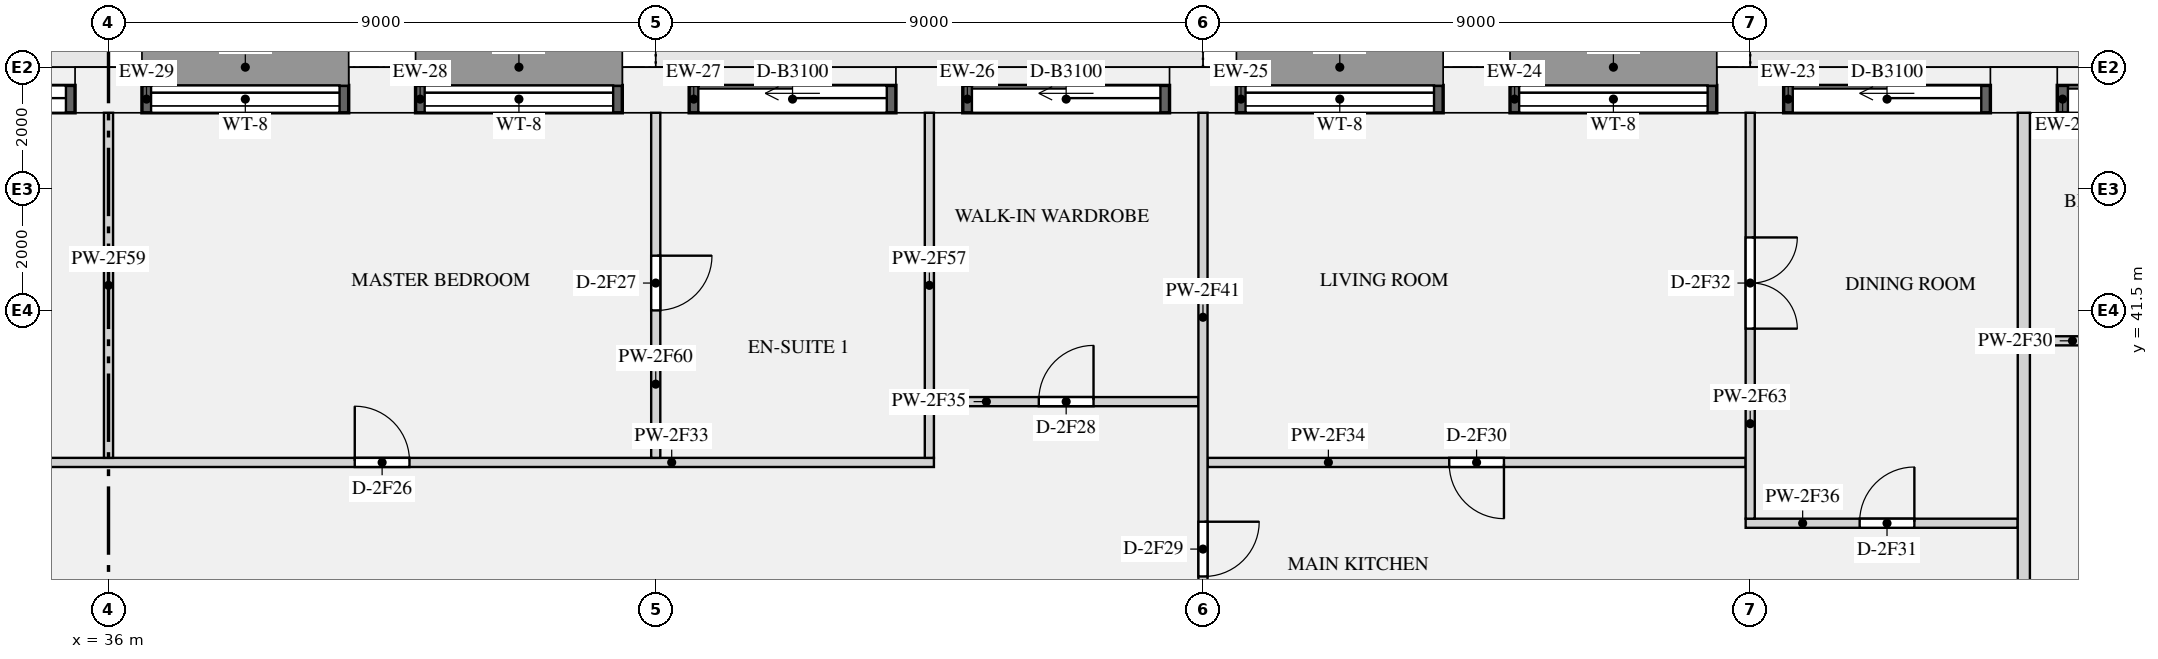
"""IFC4 building model, lengths in metres.
Left out: names, types, materials, properties, quantities, classifications, styles, units other than length and angle.
Written with IfcOpenShell. Run it as: python <this file> out.ifc"""

import sys

from ifc_helpers import new_model, si_unit, direction, frame, frame_2d, origin, origin_2d, place, context, subcontext, project, spatial, rectangle, extrude, element, fill, save


model = new_model("IFC4")
c1 = context("Model", 3, precision=1e-05, world=origin(), true_north=direction((0.0, 1.0)))
c2 = subcontext(c1, "Body", "Model", "MODEL_VIEW")
j1 = project(units=[si_unit("LENGTHUNIT", "METRE"), si_unit("PLANEANGLEUNIT", "RADIAN")], contexts=[c1])
p1 = place(None, origin())
s1 = spatial("IfcSite", under=j1, at=p1, CompositionType="ELEMENT")
p2 = place(p1, origin())
s2 = spatial("IfcBuilding", under=s1, at=p2, CompositionType="ELEMENT")
p3 = place(p2, frame((0.0, 0.0, 127.65)))
s3 = spatial("IfcBuildingStorey", under=s2, at=p3, CompositionType="ELEMENT", Elevation=127.65)
for number, where, z_axis, x_axis in (
    (1, (67.5, 45.125, 0.0), (0.0, 0.0, 1.0), (-1.0, 0.0, 0.0)),
    (2, (63.0, 45.125, 0.0), (0.0, 0.0, 1.0), (-1.0, 0.0, 0.0)),
    (3, (58.5, 45.125, 0.0), (0.0, 0.0, 1.0), (-1.0, 0.0, 0.0)),
    (4, (54.0, 45.125, 0.0), (0.0, 0.0, 1.0), (-1.0, 0.0, 0.0)),
    (5, (49.5, 45.125, 0.0), (0.0, 0.0, 1.0), (-1.0, 0.0, 0.0)),
    (6, (45.0, 45.125, 0.0), (0.0, 0.0, 1.0), (-1.0, 0.0, 0.0)),
    (7, (40.5, 45.125, 0.0), (0.0, 0.0, 1.0), (-1.0, 0.0, 0.0)),
    (8, (36.0, 45.125, 0.0), (0.0, 0.0, 1.0), (-1.0, 0.0, 0.0)),
):
    element("IfcColumn", number, at=place(p3, frame(where, z_axis=z_axis, x_axis=x_axis)), inside=s3, PredefinedType="USERDEFINED", context=c2, shape_type="SweptSolid", body=[
        extrude(rectangle(XDim=1.1, YDim=0.75, at=origin_2d()), origin(), (0.0, 0.0, 1.0), 3.15),
    ])
p4 = place(p3, frame((70.9, 44.975, 0.0), z_axis=(0.0, 0.0, 1.0), x_axis=(-1.0, 0.0, 0.0)))
e9 = element("IfcWall", 9, at=p4, inside=s3, PredefinedType="SOLIDWALL", context=c2, shape_type="SweptSolid", body=[
    extrude(rectangle(XDim=2.85, YDim=0.45, at=frame_2d((1.425, 0.0))), origin(), (0.0, 0.0, 1.0), 2.65),
])
p5 = place(p4, frame((0.175, 0.0, 0.0)))
e10 = element("IfcOpeningElement", 10, at=p5, cuts=e9, PredefinedType="OPENING", context=c2, shape_type="SweptSolid", body=[
    extrude(rectangle(XDim=2.5, YDim=2.3, at=frame_2d((1.25, 1.15))), frame((0.0, 0.235, 0.0), z_axis=(0.0, -1.0, 0.0), x_axis=(1.0, 0.0, 0.0)), (0.0, 0.0, 1.0), 0.47),
])
p6 = place(p3, frame((66.95, 44.975, 0.0), z_axis=(0.0, 0.0, 1.0), x_axis=(-1.0, 0.0, 0.0)))
e11 = element("IfcWall", 11, at=p6, inside=s3, PredefinedType="SOLIDWALL", context=c2, shape_type="SweptSolid", body=[
    extrude(rectangle(XDim=3.4, YDim=0.45, at=frame_2d((1.7, 0.0))), origin(), (0.0, 0.0, 1.0), 2.65),
])
p7 = place(p6, frame((0.15, 0.0, 0.0)))
e12 = element("IfcOpeningElement", 12, at=p7, cuts=e11, PredefinedType="OPENING", context=c2, shape_type="SweptSolid", body=[
    extrude(rectangle(XDim=3.1, YDim=2.3, at=frame_2d((1.55, 1.15))), frame((0.0, 0.235, 0.0), z_axis=(0.0, -1.0, 0.0), x_axis=(1.0, 0.0, 0.0)), (0.0, 0.0, 1.0), 0.47),
])
p8 = place(p3, frame((62.45, 44.975, 0.9), z_axis=(0.0, 0.0, 1.0), x_axis=(-1.0, 0.0, 0.0)))
e13 = element("IfcWall", 13, at=p8, inside=s3, PredefinedType="SOLIDWALL", context=c2, shape_type="SweptSolid", body=[
    extrude(rectangle(XDim=3.4, YDim=0.45, at=frame_2d((1.7, 0.0))), origin(), (0.0, 0.0, 1.0), 1.75),
])
p9 = place(p8, frame((0.15, 0.0, 0.15)))
e14 = element("IfcOpeningElement", 14, at=p9, cuts=e13, PredefinedType="OPENING", context=c2, shape_type="SweptSolid", body=[
    extrude(rectangle(XDim=3.1, YDim=1.5, at=frame_2d((1.55, 0.75))), frame((0.0, 0.235, 0.0), z_axis=(0.0, -1.0, 0.0), x_axis=(1.0, 0.0, 0.0)), (0.0, 0.0, 1.0), 0.47),
])
p10 = place(p3, frame((57.95, 44.975, 0.9), z_axis=(0.0, 0.0, 1.0), x_axis=(-1.0, 0.0, 0.0)))
e15 = element("IfcWall", 15, at=p10, inside=s3, PredefinedType="SOLIDWALL", context=c2, shape_type="SweptSolid", body=[
    extrude(rectangle(XDim=3.4, YDim=0.45, at=frame_2d((1.7, 0.0))), origin(), (0.0, 0.0, 1.0), 1.75),
])
p11 = place(p10, frame((0.15, 0.0, 0.15)))
e16 = element("IfcOpeningElement", 16, at=p11, cuts=e15, PredefinedType="OPENING", context=c2, shape_type="SweptSolid", body=[
    extrude(rectangle(XDim=3.1, YDim=1.5, at=frame_2d((1.55, 0.75))), frame((0.0, 0.235, 0.0), z_axis=(0.0, -1.0, 0.0), x_axis=(1.0, 0.0, 0.0)), (0.0, 0.0, 1.0), 0.47),
])
p12 = place(p3, frame((53.45, 44.975, 0.0), z_axis=(0.0, 0.0, 1.0), x_axis=(-1.0, 0.0, 0.0)))
e17 = element("IfcWall", 17, at=p12, inside=s3, PredefinedType="SOLIDWALL", context=c2, shape_type="SweptSolid", body=[
    extrude(rectangle(XDim=3.4, YDim=0.45, at=frame_2d((1.7, 0.0))), origin(), (0.0, 0.0, 1.0), 2.65),
])
p13 = place(p12, frame((0.15, 0.0, 0.0)))
e18 = element("IfcOpeningElement", 18, at=p13, cuts=e17, PredefinedType="OPENING", context=c2, shape_type="SweptSolid", body=[
    extrude(rectangle(XDim=3.1, YDim=2.3, at=frame_2d((1.55, 1.15))), frame((0.0, 0.235, 0.0), z_axis=(0.0, -1.0, 0.0), x_axis=(1.0, 0.0, 0.0)), (0.0, 0.0, 1.0), 0.47),
])
p14 = place(p3, frame((48.95, 44.975, 0.0), z_axis=(0.0, 0.0, 1.0), x_axis=(-1.0, 0.0, 0.0)))
e19 = element("IfcWall", 19, at=p14, inside=s3, PredefinedType="SOLIDWALL", context=c2, shape_type="SweptSolid", body=[
    extrude(rectangle(XDim=3.4, YDim=0.45, at=frame_2d((1.7, 0.0))), origin(), (0.0, 0.0, 1.0), 2.65),
])
p15 = place(p14, frame((0.15, 0.0, 0.0)))
e20 = element("IfcOpeningElement", 20, at=p15, cuts=e19, PredefinedType="OPENING", context=c2, shape_type="SweptSolid", body=[
    extrude(rectangle(XDim=3.1, YDim=2.3, at=frame_2d((1.55, 1.15))), frame((0.0, 0.235, 0.0), z_axis=(0.0, -1.0, 0.0), x_axis=(1.0, 0.0, 0.0)), (0.0, 0.0, 1.0), 0.47),
])
p16 = place(p3, frame((44.45, 44.975, 0.9), z_axis=(0.0, 0.0, 1.0), x_axis=(-1.0, 0.0, 0.0)))
e21 = element("IfcWall", 21, at=p16, inside=s3, PredefinedType="SOLIDWALL", context=c2, shape_type="SweptSolid", body=[
    extrude(rectangle(XDim=3.4, YDim=0.45, at=frame_2d((1.7, 0.0))), origin(), (0.0, 0.0, 1.0), 1.75),
])
p17 = place(p16, frame((0.15, 0.0, 0.15)))
e22 = element("IfcOpeningElement", 22, at=p17, cuts=e21, PredefinedType="OPENING", context=c2, shape_type="SweptSolid", body=[
    extrude(rectangle(XDim=3.1, YDim=1.5, at=frame_2d((1.55, 0.75))), frame((0.0, 0.235, 0.0), z_axis=(0.0, -1.0, 0.0), x_axis=(1.0, 0.0, 0.0)), (0.0, 0.0, 1.0), 0.47),
])
p18 = place(p3, frame((39.95, 44.975, 0.9), z_axis=(0.0, 0.0, 1.0), x_axis=(-1.0, 0.0, 0.0)))
e23 = element("IfcWall", 23, at=p18, inside=s3, PredefinedType="SOLIDWALL", context=c2, shape_type="SweptSolid", body=[
    extrude(rectangle(XDim=3.4, YDim=0.45, at=frame_2d((1.7, 0.0))), origin(), (0.0, 0.0, 1.0), 1.75),
])
p19 = place(p18, frame((0.15, 0.0, 0.15)))
e24 = element("IfcOpeningElement", 24, at=p19, cuts=e23, PredefinedType="OPENING", context=c2, shape_type="SweptSolid", body=[
    extrude(rectangle(XDim=3.1, YDim=1.5, at=frame_2d((1.55, 0.75))), frame((0.0, 0.235, 0.0), z_axis=(0.0, -1.0, 0.0), x_axis=(1.0, 0.0, 0.0)), (0.0, 0.0, 1.0), 0.47),
])
p20 = place(p3, frame((35.45, 44.975, 0.0), z_axis=(0.0, 0.0, 1.0), x_axis=(-1.0, 0.0, 0.0)))
e25 = element("IfcWall", 25, at=p20, inside=s3, PredefinedType="SOLIDWALL", context=c2, shape_type="SweptSolid", body=[
    extrude(rectangle(XDim=3.4, YDim=0.45, at=frame_2d((1.7, 0.0))), origin(), (0.0, 0.0, 1.0), 2.65),
])
p21 = place(p20, frame((0.15, 0.0, 0.0)))
e26 = element("IfcOpeningElement", 26, at=p21, cuts=e25, PredefinedType="OPENING", context=c2, shape_type="SweptSolid", body=[
    extrude(rectangle(XDim=3.1, YDim=2.3, at=frame_2d((1.55, 1.15))), frame((0.0, 0.235, 0.0), z_axis=(0.0, -1.0, 0.0), x_axis=(1.0, 0.0, 0.0)), (0.0, 0.0, 1.0), 0.47),
])
p22 = place(p3, frame((67.6, 41.0, 0.0), z_axis=(0.0, 0.0, 1.0), x_axis=(1.0, 0.0, 0.0)))
e27 = element("IfcWall", 27, at=p22, inside=s3, PredefinedType="PARTITIONING", context=c2, shape_type="SweptSolid", body=[
    extrude(rectangle(XDim=3.65, YDim=0.15, at=frame_2d((1.825, 0.0))), origin(), (0.0, 0.0, 1.0), 2.65),
])
p23 = place(p22, frame((1.4, 0.0, 0.0)))
e28 = element("IfcOpeningElement", 28, at=p23, cuts=e27, PredefinedType="OPENING", context=c2, shape_type="SweptSolid", body=[
    extrude(rectangle(XDim=0.9, YDim=2.1, at=frame_2d((0.45, 1.05))), frame((0.0, 0.085, 0.0), z_axis=(0.0, -1.0, 0.0), x_axis=(1.0, 0.0, 0.0)), (0.0, 0.0, 1.0), 0.17),
])
p24 = place(p3, frame((27.1, 39.0, 0.0), z_axis=(0.0, 0.0, 1.0), x_axis=(1.0, 0.0, 0.0)))
e29 = element("IfcWall", 29, at=p24, inside=s3, PredefinedType="PARTITIONING", context=c2, shape_type="SweptSolid", body=[
    extrude(rectangle(XDim=22.475, YDim=0.15, at=frame_2d((11.237, 0.0))), origin(), (0.0, 0.0, 1.0), 2.65),
])
p25 = place(p24, frame((1.7, 0.0, 0.0)))
e30 = element("IfcOpeningElement", 30, at=p25, cuts=e29, PredefinedType="OPENING", context=c2, shape_type="SweptSolid", body=[
    extrude(rectangle(XDim=0.9, YDim=2.1, at=frame_2d((0.45, 1.05))), frame((0.0, 0.085, 0.0), z_axis=(0.0, -1.0, 0.0), x_axis=(1.0, 0.0, 0.0)), (0.0, 0.0, 1.0), 0.17),
])
p26 = place(p24, frame((6.2, 0.0, 0.0)))
e31 = element("IfcOpeningElement", 31, at=p26, cuts=e29, PredefinedType="OPENING", context=c2, shape_type="SweptSolid", body=[
    extrude(rectangle(XDim=0.9, YDim=2.1, at=frame_2d((0.45, 1.05))), frame((0.0, 0.085, 0.0), z_axis=(0.0, -1.0, 0.0), x_axis=(1.0, 0.0, 0.0)), (0.0, 0.0, 1.0), 0.17),
])
p27 = place(p24, frame((12.95, 0.0, 0.0)))
e32 = element("IfcOpeningElement", 32, at=p27, cuts=e29, PredefinedType="OPENING", context=c2, shape_type="SweptSolid", body=[
    extrude(rectangle(XDim=0.9, YDim=2.1, at=frame_2d((0.45, 1.05))), frame((0.0, 0.085, 0.0), z_axis=(0.0, -1.0, 0.0), x_axis=(1.0, 0.0, 0.0)), (0.0, 0.0, 1.0), 0.17),
])
p28 = place(p3, frame((54.075, 39.0, 0.0), z_axis=(0.0, 0.0, 1.0), x_axis=(1.0, 0.0, 0.0)))
e33 = element("IfcWall", 33, at=p28, inside=s3, PredefinedType="PARTITIONING", context=c2, shape_type="SweptSolid", body=[
    extrude(rectangle(XDim=8.85, YDim=0.15, at=frame_2d((4.425, 0.0))), origin(), (0.0, 0.0, 1.0), 2.65),
])
p29 = place(p28, frame((3.975, 0.0, 0.0)))
e34 = element("IfcOpeningElement", 34, at=p29, cuts=e33, PredefinedType="OPENING", context=c2, shape_type="SweptSolid", body=[
    extrude(rectangle(XDim=0.9, YDim=2.1, at=frame_2d((0.45, 1.05))), frame((0.0, 0.085, 0.0), z_axis=(0.0, -1.0, 0.0), x_axis=(1.0, 0.0, 0.0)), (0.0, 0.0, 1.0), 0.17),
])
p30 = place(p3, frame((49.575, 40.0, 0.0), z_axis=(0.0, 0.0, 1.0), x_axis=(1.0, 0.0, 0.0)))
e35 = element("IfcWall", 35, at=p30, inside=s3, PredefinedType="PARTITIONING", context=c2, shape_type="SweptSolid", body=[
    extrude(rectangle(XDim=4.35, YDim=0.15, at=frame_2d((2.175, 0.0))), origin(), (0.0, 0.0, 1.0), 2.65),
])
p31 = place(p30, frame((1.725, 0.0, 0.0)))
e36 = element("IfcOpeningElement", 36, at=p31, cuts=e35, PredefinedType="OPENING", context=c2, shape_type="SweptSolid", body=[
    extrude(rectangle(XDim=0.9, YDim=2.1, at=frame_2d((0.45, 1.05))), frame((0.0, 0.085, 0.0), z_axis=(0.0, -1.0, 0.0), x_axis=(1.0, 0.0, 0.0)), (0.0, 0.0, 1.0), 0.17),
])
p32 = place(p3, frame((62.925, 38.0, 0.0), z_axis=(0.0, 0.0, 1.0), x_axis=(1.0, 0.0, 0.0)))
e37 = element("IfcWall", 37, at=p32, inside=s3, PredefinedType="PARTITIONING", context=c2, shape_type="SweptSolid", body=[
    extrude(rectangle(XDim=4.475, YDim=0.15, at=frame_2d((2.237, 0.0))), origin(), (0.0, 0.0, 1.0), 2.65),
])
p33 = place(p32, frame((1.875, 0.0, 0.0)))
e38 = element("IfcOpeningElement", 38, at=p33, cuts=e37, PredefinedType="OPENING", context=c2, shape_type="SweptSolid", body=[
    extrude(rectangle(XDim=0.9, YDim=2.1, at=frame_2d((0.45, 1.05))), frame((0.0, 0.085, 0.0), z_axis=(0.0, -1.0, 0.0), x_axis=(1.0, 0.0, 0.0)), (0.0, 0.0, 1.0), 0.17),
])
p34 = place(p3, frame((54.0, 35.475, 0.0), z_axis=(0.0, 0.0, 1.0), x_axis=(0.0, 1.0, 0.0)))
e39 = element("IfcWall", 39, at=p34, inside=s3, PredefinedType="PARTITIONING", context=c2, shape_type="SweptSolid", body=[
    extrude(rectangle(XDim=9.275, YDim=0.15, at=frame_2d((4.637, 0.0))), origin(), (0.0, 0.0, 1.0), 2.65),
])
p35 = place(p34, frame((1.65, 0.0, 0.0)))
e40 = element("IfcOpeningElement", 40, at=p35, cuts=e39, PredefinedType="OPENING", context=c2, shape_type="SweptSolid", body=[
    extrude(rectangle(XDim=0.9, YDim=2.1, at=frame_2d((0.45, 1.05))), frame((0.0, 0.085, 0.0), z_axis=(0.0, -1.0, 0.0), x_axis=(1.0, 0.0, 0.0)), (0.0, 0.0, 1.0), 0.17),
])
for number, where, z_axis, x_axis in (
    (41, (49.5, 39.075, 0.0), (0.0, 0.0, 1.0), (0.0, 1.0, 0.0)),
    (42, (36.0, 39.075, 0.0), (0.0, 0.0, 1.0), (0.0, 1.0, 0.0)),
):
    element("IfcWall", number, at=place(p3, frame(where, z_axis=z_axis, x_axis=x_axis)), inside=s3, PredefinedType="PARTITIONING", context=c2, shape_type="SweptSolid", body=[
        extrude(rectangle(XDim=5.675, YDim=0.15, at=frame_2d((2.837, 0.0))), origin(), (0.0, 0.0, 1.0), 2.65),
    ])
p36 = place(p3, frame((45.0, 39.075, 0.0), z_axis=(0.0, 0.0, 1.0), x_axis=(0.0, 1.0, 0.0)))
e43 = element("IfcWall", 43, at=p36, inside=s3, PredefinedType="PARTITIONING", context=c2, shape_type="SweptSolid", body=[
    extrude(rectangle(XDim=5.675, YDim=0.15, at=frame_2d((2.837, 0.0))), origin(), (0.0, 0.0, 1.0), 2.65),
])
p37 = place(p36, frame((2.425, 0.0, 0.0)))
e44 = element("IfcOpeningElement", 44, at=p37, cuts=e43, PredefinedType="OPENING", context=c2, shape_type="SweptSolid", body=[
    extrude(rectangle(XDim=0.9, YDim=2.1, at=frame_2d((0.45, 1.05))), frame((0.0, 0.085, 0.0), z_axis=(0.0, -1.0, 0.0), x_axis=(1.0, 0.0, 0.0)), (0.0, 0.0, 1.0), 0.17),
])
p38 = place(p3, frame((63.0, 38.075, 0.0), z_axis=(0.0, 0.0, 1.0), x_axis=(0.0, 1.0, 0.0)))
e45 = element("IfcWall", 45, at=p38, inside=s3, PredefinedType="PARTITIONING", context=c2, shape_type="SweptSolid", body=[
    extrude(rectangle(XDim=6.675, YDim=0.15, at=frame_2d((3.337, 0.0))), origin(), (0.0, 0.0, 1.0), 2.65),
])
p39 = place(p38, frame((3.125, 0.0, 0.0)))
e46 = element("IfcOpeningElement", 46, at=p39, cuts=e45, PredefinedType="OPENING", context=c2, shape_type="SweptSolid", body=[
    extrude(rectangle(XDim=1.5, YDim=2.1, at=frame_2d((0.75, 1.05))), frame((0.0, 0.085, 0.0), z_axis=(0.0, -1.0, 0.0), x_axis=(1.0, 0.0, 0.0)), (0.0, 0.0, 1.0), 0.17),
])
p40 = place(p3, frame((67.5, 24.575, 0.0), z_axis=(0.0, 0.0, 1.0), x_axis=(0.0, 1.0, 0.0)))
e47 = element("IfcWall", 47, at=p40, inside=s3, PredefinedType="PARTITIONING", context=c2, shape_type="SweptSolid", body=[
    extrude(rectangle(XDim=20.175, YDim=0.2, at=frame_2d((10.087, 0.0))), origin(), (0.0, 0.0, 1.0), 2.65),
])
p41 = place(p5, origin())
e48 = element("IfcDoor", 48, at=p41, inside=s3, OperationType="SLIDING_TO_LEFT", PredefinedType="DOOR", context=c2, shape_type="SweptSolid", body=[
    extrude(rectangle(XDim=2.5, YDim=2.3, at=frame_2d((1.25, 1.15))), frame((0.0, -0.07, 0.0), z_axis=(0.0, -1.0, 0.0), x_axis=(1.0, 0.0, 0.0)), (0.0, 0.0, 1.0), 0.05),
])
fill(e10, e48)
p42 = place(p7, origin())
e49 = element("IfcDoor", 49, at=p42, inside=s3, OperationType="SLIDING_TO_LEFT", PredefinedType="DOOR", context=c2, shape_type="SweptSolid", body=[
    extrude(rectangle(XDim=3.1, YDim=2.3, at=frame_2d((1.55, 1.15))), frame((0.0, -0.07, 0.0), z_axis=(0.0, -1.0, 0.0), x_axis=(1.0, 0.0, 0.0)), (0.0, 0.0, 1.0), 0.05),
])
fill(e12, e49)
p43 = place(p9, origin())
e50 = element("IfcWindow", 50, at=p43, inside=s3, PartitioningType="SINGLE_PANEL", PredefinedType="WINDOW", context=c2, shape_type="SweptSolid", body=[
    extrude(rectangle(XDim=3.1, YDim=1.5, at=frame_2d((1.55, 0.75))), frame((0.0, -0.065, 0.0), z_axis=(0.0, -1.0, 0.0), x_axis=(1.0, 0.0, 0.0)), (0.0, 0.0, 1.0), 0.06),
])
fill(e14, e50)
p44 = place(p11, origin())
e51 = element("IfcWindow", 51, at=p44, inside=s3, PartitioningType="SINGLE_PANEL", PredefinedType="WINDOW", context=c2, shape_type="SweptSolid", body=[
    extrude(rectangle(XDim=3.1, YDim=1.5, at=frame_2d((1.55, 0.75))), frame((0.0, -0.065, 0.0), z_axis=(0.0, -1.0, 0.0), x_axis=(1.0, 0.0, 0.0)), (0.0, 0.0, 1.0), 0.06),
])
fill(e16, e51)
p45 = place(p13, origin())
e52 = element("IfcDoor", 52, at=p45, inside=s3, OperationType="SLIDING_TO_LEFT", PredefinedType="DOOR", context=c2, shape_type="SweptSolid", body=[
    extrude(rectangle(XDim=3.1, YDim=2.3, at=frame_2d((1.55, 1.15))), frame((0.0, -0.07, 0.0), z_axis=(0.0, -1.0, 0.0), x_axis=(1.0, 0.0, 0.0)), (0.0, 0.0, 1.0), 0.05),
])
fill(e18, e52)
p46 = place(p15, origin())
e53 = element("IfcDoor", 53, at=p46, inside=s3, OperationType="SLIDING_TO_LEFT", PredefinedType="DOOR", context=c2, shape_type="SweptSolid", body=[
    extrude(rectangle(XDim=3.1, YDim=2.3, at=frame_2d((1.55, 1.15))), frame((0.0, -0.07, 0.0), z_axis=(0.0, -1.0, 0.0), x_axis=(1.0, 0.0, 0.0)), (0.0, 0.0, 1.0), 0.05),
])
fill(e20, e53)
p47 = place(p17, origin())
e54 = element("IfcWindow", 54, at=p47, inside=s3, PartitioningType="SINGLE_PANEL", PredefinedType="WINDOW", context=c2, shape_type="SweptSolid", body=[
    extrude(rectangle(XDim=3.1, YDim=1.5, at=frame_2d((1.55, 0.75))), frame((0.0, -0.065, 0.0), z_axis=(0.0, -1.0, 0.0), x_axis=(1.0, 0.0, 0.0)), (0.0, 0.0, 1.0), 0.06),
])
fill(e22, e54)
p48 = place(p19, origin())
e55 = element("IfcWindow", 55, at=p48, inside=s3, PartitioningType="SINGLE_PANEL", PredefinedType="WINDOW", context=c2, shape_type="SweptSolid", body=[
    extrude(rectangle(XDim=3.1, YDim=1.5, at=frame_2d((1.55, 0.75))), frame((0.0, -0.065, 0.0), z_axis=(0.0, -1.0, 0.0), x_axis=(1.0, 0.0, 0.0)), (0.0, 0.0, 1.0), 0.06),
])
fill(e24, e55)
p49 = place(p21, origin())
e56 = element("IfcDoor", 56, at=p49, inside=s3, OperationType="SLIDING_TO_LEFT", PredefinedType="DOOR", context=c2, shape_type="SweptSolid", body=[
    extrude(rectangle(XDim=3.1, YDim=2.3, at=frame_2d((1.55, 1.15))), frame((0.0, -0.07, 0.0), z_axis=(0.0, -1.0, 0.0), x_axis=(1.0, 0.0, 0.0)), (0.0, 0.0, 1.0), 0.05),
])
fill(e26, e56)
p50 = place(p27, origin())
e57 = element("IfcDoor", 57, at=p50, inside=s3, OperationType="SINGLE_SWING_LEFT", PredefinedType="DOOR", context=c2, shape_type="SweptSolid", body=[
    extrude(rectangle(XDim=0.9, YDim=2.1, at=frame_2d((0.45, 1.05))), frame((0.0, 0.025, 0.0), z_axis=(0.0, -1.0, 0.0), x_axis=(1.0, 0.0, 0.0)), (0.0, 0.0, 1.0), 0.05),
])
fill(e32, e57)
p51 = place(p37, frame((0.9, 0.0, 0.0), z_axis=(0.0, 0.0, 1.0), x_axis=(-1.0, 0.0, 0.0)))
e58 = element("IfcDoor", 58, at=p51, inside=s3, OperationType="SINGLE_SWING_LEFT", PredefinedType="DOOR", context=c2, shape_type="SweptSolid", body=[
    extrude(rectangle(XDim=0.9, YDim=2.1, at=frame_2d((0.45, 1.05))), frame((0.0, 0.025, 0.0), z_axis=(0.0, -1.0, 0.0), x_axis=(1.0, 0.0, 0.0)), (0.0, 0.0, 1.0), 0.05),
])
fill(e44, e58)
p52 = place(p31, origin())
e59 = element("IfcDoor", 59, at=p52, inside=s3, OperationType="SINGLE_SWING_RIGHT", PredefinedType="DOOR", context=c2, shape_type="SweptSolid", body=[
    extrude(rectangle(XDim=0.9, YDim=2.1, at=frame_2d((0.45, 1.05))), frame((0.0, 0.025, 0.0), z_axis=(0.0, -1.0, 0.0), x_axis=(1.0, 0.0, 0.0)), (0.0, 0.0, 1.0), 0.05),
])
fill(e36, e59)
p53 = place(p35, frame((0.9, 0.0, 0.0), z_axis=(0.0, 0.0, 1.0), x_axis=(-1.0, 0.0, 0.0)))
e60 = element("IfcDoor", 60, at=p53, inside=s3, OperationType="SINGLE_SWING_LEFT", PredefinedType="DOOR", context=c2, shape_type="SweptSolid", body=[
    extrude(rectangle(XDim=0.9, YDim=2.1, at=frame_2d((0.45, 1.05))), frame((0.0, 0.025, 0.0), z_axis=(0.0, -1.0, 0.0), x_axis=(1.0, 0.0, 0.0)), (0.0, 0.0, 1.0), 0.05),
])
fill(e40, e60)
p54 = place(p29, frame((0.9, 0.0, 0.0), z_axis=(0.0, 0.0, 1.0), x_axis=(-1.0, 0.0, 0.0)))
e61 = element("IfcDoor", 61, at=p54, inside=s3, OperationType="SINGLE_SWING_LEFT", PredefinedType="DOOR", context=c2, shape_type="SweptSolid", body=[
    extrude(rectangle(XDim=0.9, YDim=2.1, at=frame_2d((0.45, 1.05))), frame((0.0, 0.025, 0.0), z_axis=(0.0, -1.0, 0.0), x_axis=(1.0, 0.0, 0.0)), (0.0, 0.0, 1.0), 0.05),
])
fill(e34, e61)
p55 = place(p33, origin())
e62 = element("IfcDoor", 62, at=p55, inside=s3, OperationType="SINGLE_SWING_RIGHT", PredefinedType="DOOR", context=c2, shape_type="SweptSolid", body=[
    extrude(rectangle(XDim=0.9, YDim=2.1, at=frame_2d((0.45, 1.05))), frame((0.0, 0.025, 0.0), z_axis=(0.0, -1.0, 0.0), x_axis=(1.0, 0.0, 0.0)), (0.0, 0.0, 1.0), 0.05),
])
fill(e38, e62)
p56 = place(p39, frame((1.5, 0.0, 0.0), z_axis=(0.0, 0.0, 1.0), x_axis=(-1.0, 0.0, 0.0)))
e63 = element("IfcDoor", 63, at=p56, inside=s3, OperationType="DOUBLE_DOOR_SINGLE_SWING", PredefinedType="DOOR", context=c2, shape_type="SweptSolid", body=[
    extrude(rectangle(XDim=1.5, YDim=2.1, at=frame_2d((0.75, 1.05))), frame((0.0, 0.025, 0.0), z_axis=(0.0, -1.0, 0.0), x_axis=(1.0, 0.0, 0.0)), (0.0, 0.0, 1.0), 0.05),
])
fill(e46, e63)
save(model, sys.argv[1])
